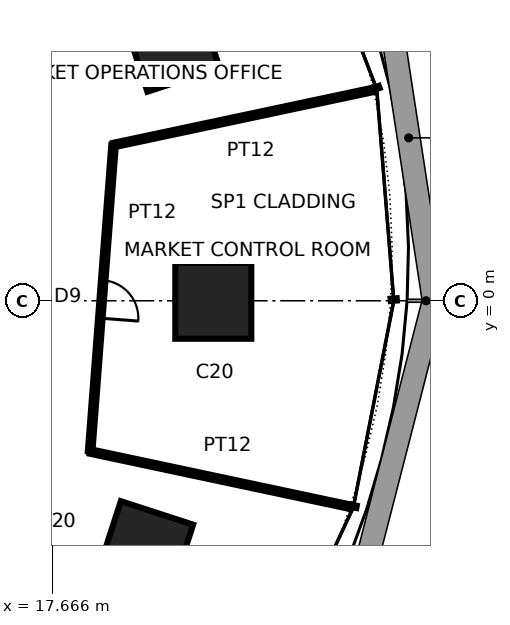
"""IFC4 building model, lengths in metres.
Left out: names, types, materials, properties, quantities, classifications, styles, units other than length and angle.
Written with IfcOpenShell. Run it as: python <this file> out.ifc"""

import sys

from ifc_helpers import new_model, si_unit, direction, frame, frame_2d, origin, origin_2d, place, context, subcontext, project, spatial, rectangle, extrude, element, fill, save


model = new_model("IFC4")
c1 = context("Model", 3, precision=1e-05, world=origin(), true_north=direction((0.0, 1.0)))
c2 = subcontext(c1, "Body", "Model", "MODEL_VIEW")
j1 = project(units=[si_unit("LENGTHUNIT", "METRE"), si_unit("PLANEANGLEUNIT", "RADIAN")], contexts=[c1])
p1 = place(None, origin())
s1 = spatial("IfcSite", under=j1, at=p1, CompositionType="ELEMENT")
p2 = place(p1, origin())
s2 = spatial("IfcBuilding", under=s1, at=p2, CompositionType="ELEMENT")
p3 = place(p2, frame((0.0, 0.0, 78.4)))
s3 = spatial("IfcBuildingStorey", under=s2, at=p3, CompositionType="ELEMENT", Elevation=78.4)
for number, where, z_axis, x_axis in (
    (1, (21.9, 0.0, 0.0), (0.0, 0.0, 1.0), (1.0, 0.0, 0.0)),
    (2, (20.808, 6.761, 0.0), (0.0, 0.0, 1.0), (0.951, 0.309, 0.0)),
    (3, (20.109, -6.534, 0.0), (0.0, 0.0, 1.0), (0.951, -0.309, 0.0)),
):
    element("IfcColumn", number, at=place(p3, frame(where, z_axis=z_axis, x_axis=x_axis)), inside=s3, PredefinedType="COLUMN", context=c2, shape_type="SweptSolid", body=[
        extrude(rectangle(XDim=2.0, YDim=2.0, at=origin_2d()), origin(), (0.0, 0.0, 1.0), 4.2),
    ])
p4 = place(p3, frame((18.659, -3.966, 0.0), z_axis=(0.0, 0.0, 1.0), x_axis=(0.978148655968, -0.207906726269, 0.0)))
e4 = element("IfcWall", 4, at=p4, inside=s3, PredefinedType="PARTITIONING", context=c2, shape_type="SweptSolid", body=[
    extrude(rectangle(XDim=7.0, YDim=0.12, at=frame_2d((3.5, 0.0))), origin(), (0.0, 0.0, 1.0), 4.04),
])
p5 = place(p3, frame((19.276, 4.097, 0.0), z_axis=(0.0, 0.0, 1.0), x_axis=(-0.076255565094, -0.997088305413, 0.0)))
e5 = element("IfcWall", 5, at=p5, inside=s3, PredefinedType="PARTITIONING", context=c2, shape_type="SweptSolid", body=[
    extrude(rectangle(XDim=8.087, YDim=0.12, at=frame_2d((4.043, 0.0))), origin(), (0.0, 0.0, 1.0), 3.586),
])
p6 = place(p5, frame((3.569, 0.0, 0.0)))
e6 = element("IfcOpeningElement", 6, at=p6, cuts=e5, PredefinedType="OPENING", context=c2, shape_type="SweptSolid", body=[
    extrude(rectangle(XDim=1.0, YDim=2.4, at=frame_2d((0.5, 1.2))), frame((0.0, 0.07, 0.0), z_axis=(0.0, -1.0, 0.0), x_axis=(1.0, 0.0, 0.0)), (0.0, 0.0, 1.0), 0.14),
])
p7 = place(p3, frame((26.123, 5.553, 0.0), z_axis=(0.0, 0.0, 1.0), x_axis=(-0.978150163492, -0.207899633622, 0.0)))
e7 = element("IfcWall", 7, at=p7, inside=s3, PredefinedType="PARTITIONING", context=c2, shape_type="SweptSolid", body=[
    extrude(rectangle(XDim=7.0, YDim=0.12, at=frame_2d((3.5, 0.0))), origin(), (0.0, 0.0, 1.0), 4.04),
])
p8 = place(p6, origin())
e8 = element("IfcDoor", 8, at=p8, inside=s3, OperationType="SINGLE_SWING_RIGHT", PredefinedType="DOOR", context=c2, shape_type="SweptSolid", body=[
    extrude(rectangle(XDim=1.0, YDim=2.4, at=frame_2d((0.5, 1.2))), frame((0.0, 0.025, 0.0), z_axis=(0.0, -1.0, 0.0), x_axis=(1.0, 0.0, 0.0)), (0.0, 0.0, 1.0), 0.05),
])
fill(e6, e8)
save(model, sys.argv[1])
